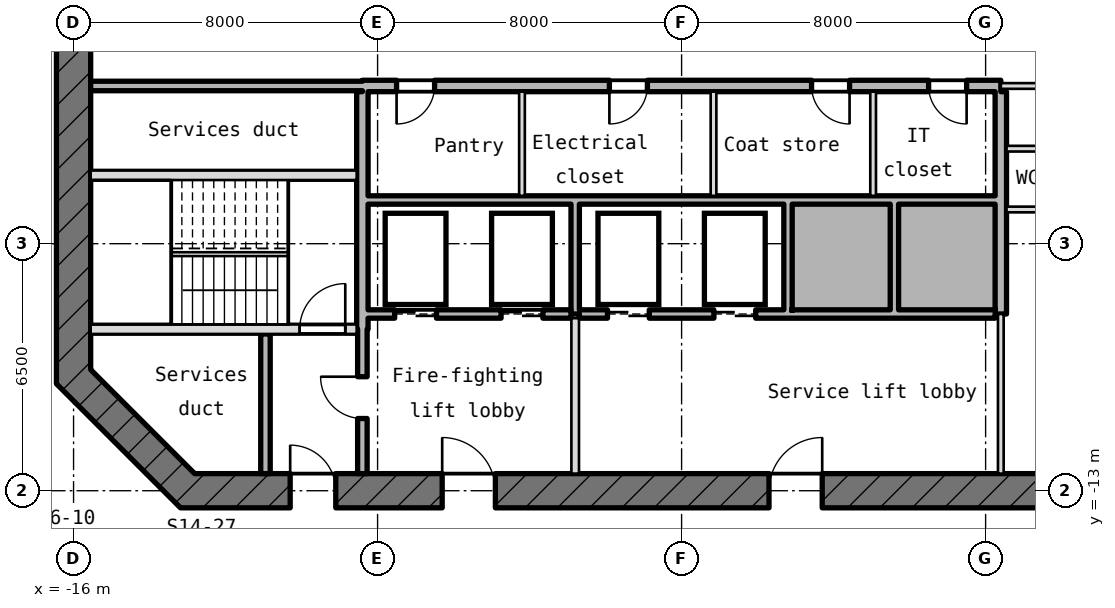
"""IFC4 building model, lengths in metres.
Left out: names, types, materials, properties, quantities, classifications, styles, units other than length and angle.
Written with IfcOpenShell. Run it as: python <this file> out.ifc"""

import sys

from ifc_helpers import new_model, si_unit, direction, frame, frame_2d, origin, place, context, subcontext, project, spatial, rectangle, extrude, element, fill, save


model = new_model("IFC4")
c1 = context("Model", 3, precision=1e-05, world=origin(), true_north=direction((0.0, 1.0)))
c2 = subcontext(c1, "Body", "Model", "MODEL_VIEW")
j1 = project(units=[si_unit("LENGTHUNIT", "METRE"), si_unit("PLANEANGLEUNIT", "RADIAN")], contexts=[c1])
p1 = place(None, origin())
s1 = spatial("IfcSite", under=j1, at=p1, CompositionType="ELEMENT")
p2 = place(p1, origin())
s2 = spatial("IfcBuilding", under=s1, at=p2, CompositionType="ELEMENT")
p3 = place(p2, frame((0.0, 0.0, 210.85)))
s3 = spatial("IfcBuildingStorey", under=s2, at=p3, CompositionType="ELEMENT", Elevation=210.85)
p4 = place(p3, frame((-16.0, 10.186, -0.18), z_axis=(0.0, 0.0, 1.0), x_axis=(0.0, -1.0, 0.0)))
e1 = element("IfcWall", 1, at=p4, inside=s3, PredefinedType="SHEAR", context=c2, shape_type="SweptSolid", body=[
    extrude(rectangle(XDim=20.373, YDim=0.9, at=frame_2d((10.186, 0.0))), origin(), (0.0, 0.0, 1.0), 4.15),
])
p5 = place(p4, frame((8.986, 0.0, 0.18)))
e2 = element("IfcOpeningElement", 2, at=p5, cuts=e1, PredefinedType="OPENING", context=c2, shape_type="SweptSolid", body=[
    extrude(rectangle(XDim=2.4, YDim=2.1, at=frame_2d((1.2, 1.05))), frame((0.0, 0.46, 0.0), z_axis=(0.0, -1.0, 0.0), x_axis=(1.0, 0.0, 0.0)), (0.0, 0.0, 1.0), 0.92),
])
p6 = place(p4, frame((5.586, 0.0, 0.18)))
e3 = element("IfcOpeningElement", 3, at=p6, cuts=e1, PredefinedType="OPENING", context=c2, shape_type="SweptSolid", body=[
    extrude(rectangle(XDim=1.2, YDim=2.1, at=frame_2d((0.6, 1.05))), frame((0.0, 0.46, 0.0), z_axis=(0.0, -1.0, 0.0), x_axis=(1.0, 0.0, 0.0)), (0.0, 0.0, 1.0), 0.92),
])
p7 = place(p3, frame((-16.132, -9.868, -0.18), z_axis=(0.0, 0.0, 1.0), x_axis=(0.707106781187, -0.707106781187, 0.0)))
e4 = element("IfcWall", 4, at=p7, inside=s3, PredefinedType="SHEAR", context=c2, shape_type="SweptSolid", body=[
    extrude(rectangle(XDim=4.615, YDim=0.9, at=frame_2d((2.308, 0.0))), origin(), (0.0, 0.0, 1.0), 4.15),
])
p8 = place(p3, frame((-13.186, -13.0, -0.18), z_axis=(0.0, 0.0, 1.0), x_axis=(1.0, 0.0, 0.0)))
e5 = element("IfcWall", 5, at=p8, inside=s3, PredefinedType="SHEAR", context=c2, shape_type="SweptSolid", body=[
    extrude(rectangle(XDim=26.373, YDim=0.9, at=frame_2d((13.186, 0.0))), origin(), (0.0, 0.0, 1.0), 4.15),
])
p9 = place(p8, frame((2.886, 0.0, 0.18)))
e6 = element("IfcOpeningElement", 6, at=p9, cuts=e5, PredefinedType="OPENING", context=c2, shape_type="SweptSolid", body=[
    extrude(rectangle(XDim=1.2, YDim=2.1, at=frame_2d((0.6, 1.05))), frame((0.0, 0.46, 0.0), z_axis=(0.0, -1.0, 0.0), x_axis=(1.0, 0.0, 0.0)), (0.0, 0.0, 1.0), 0.92),
])
p10 = place(p8, frame((6.886, 0.0, 0.18)))
e7 = element("IfcOpeningElement", 7, at=p10, cuts=e5, PredefinedType="OPENING", context=c2, shape_type="SweptSolid", body=[
    extrude(rectangle(XDim=1.4, YDim=2.1, at=frame_2d((0.7, 1.05))), frame((0.0, 0.46, 0.0), z_axis=(0.0, -1.0, 0.0), x_axis=(1.0, 0.0, 0.0)), (0.0, 0.0, 1.0), 0.92),
])
p11 = place(p8, frame((15.486, 0.0, 0.18)))
e8 = element("IfcOpeningElement", 8, at=p11, cuts=e5, PredefinedType="OPENING", context=c2, shape_type="SweptSolid", body=[
    extrude(rectangle(XDim=1.4, YDim=2.1, at=frame_2d((0.7, 1.05))), frame((0.0, 0.46, 0.0), z_axis=(0.0, -1.0, 0.0), x_axis=(1.0, 0.0, 0.0)), (0.0, 0.0, 1.0), 0.92),
])
p12 = place(p3, frame((-15.55, -8.75, -0.18), z_axis=(0.0, 0.0, 1.0), x_axis=(1.0, 0.0, 0.0)))
e9 = element("IfcWall", 9, at=p12, inside=s3, PredefinedType="SHEAR", context=c2, shape_type="SweptSolid", body=[
    extrude(rectangle(XDim=7.0, YDim=0.25, at=frame_2d((3.5, 0.0))), origin(), (0.0, 0.0, 1.0), 4.15),
])
p13 = place(p12, frame((5.5, 0.0, 0.18)))
e10 = element("IfcOpeningElement", 10, at=p13, cuts=e9, PredefinedType="OPENING", context=c2, shape_type="SweptSolid", body=[
    extrude(rectangle(XDim=1.2, YDim=2.1, at=frame_2d((0.6, 1.05))), frame((0.0, 0.135, 0.0), z_axis=(0.0, -1.0, 0.0), x_axis=(1.0, 0.0, 0.0)), (0.0, 0.0, 1.0), 0.27),
])
p14 = place(p3, frame((-8.25, -8.35, 0.0), z_axis=(0.0, 0.0, 1.0), x_axis=(1.0, 0.0, 0.0)))
e11 = element("IfcWall", 11, at=p14, inside=s3, PredefinedType="STANDARD", context=c2, shape_type="SweptSolid", body=[
    extrude(rectangle(XDim=5.34, YDim=0.22, at=frame_2d((2.67, 0.0))), origin(), (0.0, 0.0, 1.0), 3.97),
])
p15 = place(p14, frame((0.7, 0.0, 0.0)))
e12 = element("IfcOpeningElement", 12, at=p15, cuts=e11, PredefinedType="OPENING", context=c2, shape_type="SweptSolid", body=[
    extrude(rectangle(XDim=1.1, YDim=2.1, at=frame_2d((0.55, 1.05))), frame((0.0, 0.12, 0.0), z_axis=(0.0, -1.0, 0.0), x_axis=(1.0, 0.0, 0.0)), (0.0, 0.0, 1.0), 0.24),
])
p16 = place(p14, frame((3.5, 0.0, 0.0)))
e13 = element("IfcOpeningElement", 13, at=p16, cuts=e11, PredefinedType="OPENING", context=c2, shape_type="SweptSolid", body=[
    extrude(rectangle(XDim=1.1, YDim=2.1, at=frame_2d((0.55, 1.05))), frame((0.0, 0.12, 0.0), z_axis=(0.0, -1.0, 0.0), x_axis=(1.0, 0.0, 0.0)), (0.0, 0.0, 1.0), 0.24),
])
p17 = place(p3, frame((-2.69, -8.35, 0.0), z_axis=(0.0, 0.0, 1.0), x_axis=(1.0, 0.0, 0.0)))
e14 = element("IfcWall", 14, at=p17, inside=s3, PredefinedType="STANDARD", context=c2, shape_type="SweptSolid", body=[
    extrude(rectangle(XDim=10.94, YDim=0.22, at=frame_2d((5.47, 0.0))), origin(), (0.0, 0.0, 1.0), 3.97),
])
p18 = place(p17, frame((0.74, 0.0, 0.0)))
e15 = element("IfcOpeningElement", 15, at=p18, cuts=e14, PredefinedType="OPENING", context=c2, shape_type="SweptSolid", body=[
    extrude(rectangle(XDim=1.1, YDim=2.1, at=frame_2d((0.55, 1.05))), frame((0.0, 0.12, 0.0), z_axis=(0.0, -1.0, 0.0), x_axis=(1.0, 0.0, 0.0)), (0.0, 0.0, 1.0), 0.24),
])
p19 = place(p17, frame((3.54, 0.0, 0.0)))
e16 = element("IfcOpeningElement", 16, at=p19, cuts=e14, PredefinedType="OPENING", context=c2, shape_type="SweptSolid", body=[
    extrude(rectangle(XDim=1.1, YDim=2.1, at=frame_2d((0.55, 1.05))), frame((0.0, 0.12, 0.0), z_axis=(0.0, -1.0, 0.0), x_axis=(1.0, 0.0, 0.0)), (0.0, 0.0, 1.0), 0.24),
])
p20 = place(p3, frame((8.55, -5.6, 0.0), z_axis=(0.0, 0.0, 1.0), x_axis=(1.0, 0.0, 0.0)))
e17 = element("IfcWall", 17, at=p20, inside=s3, PredefinedType="PARTITIONING", context=c2, shape_type="SweptSolid", body=[
    extrude(rectangle(XDim=7.0, YDim=0.15, at=frame_2d((3.5, 0.0))), origin(), (0.0, 0.0, 1.0), 3.97),
])
p21 = place(p20, frame((2.925, 0.0, 0.0)))
e18 = element("IfcOpeningElement", 18, at=p21, cuts=e17, PredefinedType="OPENING", context=c2, shape_type="SweptSolid", body=[
    extrude(rectangle(XDim=1.0, YDim=2.1, at=frame_2d((0.5, 1.05))), frame((0.0, 0.085, 0.0), z_axis=(0.0, -1.0, 0.0), x_axis=(1.0, 0.0, 0.0)), (0.0, 0.0, 1.0), 0.17),
])
p22 = place(p3, frame((-8.25, -5.35, 0.0), z_axis=(0.0, 0.0, 1.0), x_axis=(1.0, 0.0, 0.0)))
e19 = element("IfcWall", 19, at=p22, inside=s3, PredefinedType="STANDARD", context=c2, shape_type="SweptSolid", body=[
    extrude(rectangle(XDim=16.5, YDim=0.22, at=frame_2d((8.25, 0.0))), origin(), (0.0, 0.0, 1.0), 3.97),
])
p23 = place(p3, frame((-15.55, -4.7, -0.18), z_axis=(0.0, 0.0, 1.0), x_axis=(1.0, 0.0, 0.0)))
e20 = element("IfcWall", 20, at=p23, inside=s3, PredefinedType="SHEAR", context=c2, shape_type="SweptSolid", body=[
    extrude(rectangle(XDim=7.0, YDim=0.25, at=frame_2d((3.5, 0.0))), origin(), (0.0, 0.0, 1.0), 4.15),
])
p24 = place(p3, frame((8.55, -4.0, 0.0), z_axis=(0.0, 0.0, 1.0), x_axis=(1.0, 0.0, 0.0)))
e21 = element("IfcWall", 21, at=p24, inside=s3, PredefinedType="PARTITIONING", context=c2, shape_type="SweptSolid", body=[
    extrude(rectangle(XDim=7.0, YDim=0.15, at=frame_2d((3.5, 0.0))), origin(), (0.0, 0.0, 1.0), 3.97),
])
p25 = place(p24, frame((2.925, 0.0, 0.0)))
e22 = element("IfcOpeningElement", 22, at=p25, cuts=e21, PredefinedType="OPENING", context=c2, shape_type="SweptSolid", body=[
    extrude(rectangle(XDim=1.0, YDim=2.1, at=frame_2d((0.5, 1.05))), frame((0.0, 0.085, 0.0), z_axis=(0.0, -1.0, 0.0), x_axis=(1.0, 0.0, 0.0)), (0.0, 0.0, 1.0), 0.17),
])
p26 = place(p3, frame((-15.55, -2.35, 0.0), z_axis=(0.0, 0.0, 1.0), x_axis=(1.0, 0.0, 0.0)))
e23 = element("IfcWall", 23, at=p26, inside=s3, PredefinedType="STANDARD", context=c2, shape_type="SweptSolid", body=[
    extrude(rectangle(XDim=7.15, YDim=0.25, at=frame_2d((3.575, 0.0))), origin(), (0.0, 0.0, 1.0), 3.97),
])
p27 = place(p3, frame((-8.4, -2.35, -0.18), z_axis=(0.0, 0.0, 1.0), x_axis=(1.0, 0.0, 0.0)))
e24 = element("IfcWall", 24, at=p27, inside=s3, PredefinedType="SHEAR", context=c2, shape_type="SweptSolid", body=[
    extrude(rectangle(XDim=16.8, YDim=0.3, at=frame_2d((8.4, 0.0))), origin(), (0.0, 0.0, 1.0), 4.15),
])
p28 = place(p27, frame((0.9, 0.0, 0.18)))
e25 = element("IfcOpeningElement", 25, at=p28, cuts=e24, PredefinedType="OPENING", context=c2, shape_type="SweptSolid", body=[
    extrude(rectangle(XDim=1.0, YDim=2.1, at=frame_2d((0.5, 1.05))), frame((0.0, 0.16, 0.0), z_axis=(0.0, -1.0, 0.0), x_axis=(1.0, 0.0, 0.0)), (0.0, 0.0, 1.0), 0.32),
])
p29 = place(p27, frame((6.5, 0.0, 0.18)))
e26 = element("IfcOpeningElement", 26, at=p29, cuts=e24, PredefinedType="OPENING", context=c2, shape_type="SweptSolid", body=[
    extrude(rectangle(XDim=1.0, YDim=2.1, at=frame_2d((0.5, 1.05))), frame((0.0, 0.16, 0.0), z_axis=(0.0, -1.0, 0.0), x_axis=(1.0, 0.0, 0.0)), (0.0, 0.0, 1.0), 0.32),
])
p30 = place(p27, frame((11.82, 0.0, 0.18)))
e27 = element("IfcOpeningElement", 27, at=p30, cuts=e24, PredefinedType="OPENING", context=c2, shape_type="SweptSolid", body=[
    extrude(rectangle(XDim=1.0, YDim=2.1, at=frame_2d((0.5, 1.05))), frame((0.0, 0.16, 0.0), z_axis=(0.0, -1.0, 0.0), x_axis=(1.0, 0.0, 0.0)), (0.0, 0.0, 1.0), 0.32),
])
p31 = place(p27, frame((14.9, 0.0, 0.18)))
e28 = element("IfcOpeningElement", 28, at=p31, cuts=e24, PredefinedType="OPENING", context=c2, shape_type="SweptSolid", body=[
    extrude(rectangle(XDim=1.0, YDim=2.1, at=frame_2d((0.5, 1.05))), frame((0.0, 0.16, 0.0), z_axis=(0.0, -1.0, 0.0), x_axis=(1.0, 0.0, 0.0)), (0.0, 0.0, 1.0), 0.32),
])
p32 = place(p3, frame((8.4, -2.35, 0.0), z_axis=(0.0, 0.0, 1.0), x_axis=(1.0, 0.0, 0.0)))
e29 = element("IfcWall", 29, at=p32, inside=s3, PredefinedType="PARTITIONING", context=c2, shape_type="SweptSolid", body=[
    extrude(rectangle(XDim=7.15, YDim=0.15, at=frame_2d((3.575, 0.0))), origin(), (0.0, 0.0, 1.0), 3.97),
])
p33 = place(p3, frame((-10.95, -12.55, 0.0), z_axis=(0.0, 0.0, 1.0), x_axis=(0.0, 1.0, 0.0)))
e30 = element("IfcWall", 30, at=p33, inside=s3, PredefinedType="STANDARD", context=c2, shape_type="SweptSolid", body=[
    extrude(rectangle(XDim=3.675, YDim=0.25, at=frame_2d((1.837, 0.0))), origin(), (0.0, 0.0, 1.0), 3.97),
])
p34 = place(p3, frame((-8.4, -12.55, 0.0), z_axis=(0.0, 0.0, 1.0), x_axis=(0.0, 1.0, 0.0)))
e31 = element("IfcWall", 31, at=p34, inside=s3, PredefinedType="STANDARD", context=c2, shape_type="SweptSolid", body=[
    extrude(rectangle(XDim=3.8, YDim=0.25, at=frame_2d((1.9, 0.0))), origin(), (0.0, 0.0, 1.0), 3.97),
])
p35 = place(p34, frame((1.45, 0.0, 0.0)))
e32 = element("IfcOpeningElement", 32, at=p35, cuts=e31, PredefinedType="OPENING", context=c2, shape_type="SweptSolid", body=[
    extrude(rectangle(XDim=1.1, YDim=2.1, at=frame_2d((0.55, 1.05))), frame((0.0, 0.135, 0.0), z_axis=(0.0, -1.0, 0.0), x_axis=(1.0, 0.0, 0.0)), (0.0, 0.0, 1.0), 0.27),
])
p36 = place(p3, frame((-8.4, -8.75, -0.18), z_axis=(0.0, 0.0, 1.0), x_axis=(0.0, 1.0, 0.0)))
e33 = element("IfcWall", 33, at=p36, inside=s3, PredefinedType="SHEAR", context=c2, shape_type="SweptSolid", body=[
    extrude(rectangle(XDim=6.25, YDim=0.3, at=frame_2d((3.125, 0.0))), origin(), (0.0, 0.0, 1.0), 4.15),
])
p37 = place(p3, frame((-4.2, -5.24, 0.0), z_axis=(0.0, 0.0, 1.0), x_axis=(0.0, 1.0, 0.0)))
e34 = element("IfcWall", 34, at=p37, inside=s3, PredefinedType="PARTITIONING", context=c2, shape_type="SweptSolid", body=[
    extrude(rectangle(XDim=2.74, YDim=0.15, at=frame_2d((1.37, 0.0))), origin(), (0.0, 0.0, 1.0), 3.97),
])
p38 = place(p3, frame((-2.8, -12.55, 0.0), z_axis=(0.0, 0.0, 1.0), x_axis=(0.0, 1.0, 0.0)))
e35 = element("IfcWall", 35, at=p38, inside=s3, PredefinedType="PARTITIONING", context=c2, shape_type="SweptSolid", body=[
    extrude(rectangle(XDim=4.09, YDim=0.2, at=frame_2d((2.045, 0.0))), origin(), (0.0, 0.0, 1.0), 3.97),
])
p39 = place(p3, frame((-2.8, -8.35, 0.0), z_axis=(0.0, 0.0, 1.0), x_axis=(0.0, 1.0, 0.0)))
e36 = element("IfcWall", 36, at=p39, inside=s3, PredefinedType="STANDARD", context=c2, shape_type="SweptSolid", body=[
    extrude(rectangle(XDim=2.89, YDim=0.22, at=frame_2d((1.445, 0.0))), origin(), (0.0, 0.0, 1.0), 3.97),
])
p40 = place(p3, frame((0.84, -5.24, 0.0), z_axis=(0.0, 0.0, 1.0), x_axis=(0.0, 1.0, 0.0)))
e37 = element("IfcWall", 37, at=p40, inside=s3, PredefinedType="PARTITIONING", context=c2, shape_type="SweptSolid", body=[
    extrude(rectangle(XDim=2.74, YDim=0.15, at=frame_2d((1.37, 0.0))), origin(), (0.0, 0.0, 1.0), 3.97),
])
p41 = place(p3, frame((2.8, -8.24, 0.0), z_axis=(0.0, 0.0, 1.0), x_axis=(0.0, 1.0, 0.0)))
e38 = element("IfcWall", 38, at=p41, inside=s3, PredefinedType="STANDARD", context=c2, shape_type="SweptSolid", body=[
    extrude(rectangle(XDim=2.78, YDim=0.22, at=frame_2d((1.39, 0.0))), origin(), (0.0, 0.0, 1.0), 3.97),
])
p42 = place(p3, frame((5.04, -5.24, 0.0), z_axis=(0.0, 0.0, 1.0), x_axis=(0.0, 1.0, 0.0)))
e39 = element("IfcWall", 39, at=p42, inside=s3, PredefinedType="PARTITIONING", context=c2, shape_type="SweptSolid", body=[
    extrude(rectangle(XDim=2.74, YDim=0.15, at=frame_2d((1.37, 0.0))), origin(), (0.0, 0.0, 1.0), 3.97),
])
p43 = place(p3, frame((5.6, -8.24, 0.0), z_axis=(0.0, 0.0, 1.0), x_axis=(0.0, 1.0, 0.0)))
e40 = element("IfcWall", 40, at=p43, inside=s3, PredefinedType="STANDARD", context=c2, shape_type="SweptSolid", body=[
    extrude(rectangle(XDim=2.78, YDim=0.22, at=frame_2d((1.39, 0.0))), origin(), (0.0, 0.0, 1.0), 3.97),
])
p44 = place(p3, frame((8.4, -12.55, 0.0), z_axis=(0.0, 0.0, 1.0), x_axis=(0.0, 1.0, 0.0)))
e41 = element("IfcWall", 41, at=p44, inside=s3, PredefinedType="PARTITIONING", context=c2, shape_type="SweptSolid", body=[
    extrude(rectangle(XDim=4.2, YDim=0.15, at=frame_2d((2.1, 0.0))), origin(), (0.0, 0.0, 1.0), 3.97),
])
p45 = place(p3, frame((8.4, -8.35, -0.18), z_axis=(0.0, 0.0, 1.0), x_axis=(0.0, 1.0, 0.0)))
e42 = element("IfcWall", 42, at=p45, inside=s3, PredefinedType="SHEAR", context=c2, shape_type="SweptSolid", body=[
    extrude(rectangle(XDim=5.85, YDim=0.3, at=frame_2d((2.925, 0.0))), origin(), (0.0, 0.0, 1.0), 4.15),
])
p46 = place(p15, origin())
e43 = element("IfcDoor", 43, at=p46, inside=s3, OperationType="DOUBLE_DOOR_SLIDING", PredefinedType="DOOR", context=c2, shape_type="SweptSolid", body=[
    extrude(rectangle(XDim=1.1, YDim=2.1, at=frame_2d((0.55, 1.05))), frame((0.0, 0.025, 0.0), z_axis=(0.0, -1.0, 0.0), x_axis=(1.0, 0.0, 0.0)), (0.0, 0.0, 1.0), 0.05),
])
fill(e12, e43)
p47 = place(p16, origin())
e44 = element("IfcDoor", 44, at=p47, inside=s3, OperationType="DOUBLE_DOOR_SLIDING", PredefinedType="DOOR", context=c2, shape_type="SweptSolid", body=[
    extrude(rectangle(XDim=1.1, YDim=2.1, at=frame_2d((0.55, 1.05))), frame((0.0, 0.025, 0.0), z_axis=(0.0, -1.0, 0.0), x_axis=(1.0, 0.0, 0.0)), (0.0, 0.0, 1.0), 0.05),
])
fill(e13, e44)
p48 = place(p18, origin())
e45 = element("IfcDoor", 45, at=p48, inside=s3, OperationType="DOUBLE_DOOR_SLIDING", PredefinedType="DOOR", context=c2, shape_type="SweptSolid", body=[
    extrude(rectangle(XDim=1.1, YDim=2.1, at=frame_2d((0.55, 1.05))), frame((0.0, 0.025, 0.0), z_axis=(0.0, -1.0, 0.0), x_axis=(1.0, 0.0, 0.0)), (0.0, 0.0, 1.0), 0.05),
])
fill(e15, e45)
p49 = place(p19, origin())
e46 = element("IfcDoor", 46, at=p49, inside=s3, OperationType="DOUBLE_DOOR_SLIDING", PredefinedType="DOOR", context=c2, shape_type="SweptSolid", body=[
    extrude(rectangle(XDim=1.1, YDim=2.1, at=frame_2d((0.55, 1.05))), frame((0.0, 0.025, 0.0), z_axis=(0.0, -1.0, 0.0), x_axis=(1.0, 0.0, 0.0)), (0.0, 0.0, 1.0), 0.05),
])
fill(e16, e46)
p50 = place(p13, origin())
e47 = element("IfcDoor", 47, at=p50, inside=s3, OperationType="SINGLE_SWING_RIGHT", PredefinedType="DOOR", context=c2, shape_type="SweptSolid", body=[
    extrude(rectangle(XDim=1.2, YDim=2.1, at=frame_2d((0.6, 1.05))), frame((0.0, 0.025, 0.0), z_axis=(0.0, -1.0, 0.0), x_axis=(1.0, 0.0, 0.0)), (0.0, 0.0, 1.0), 0.05),
])
fill(e10, e47)
p51 = place(p35, origin())
e48 = element("IfcDoor", 48, at=p51, inside=s3, OperationType="SINGLE_SWING_RIGHT", PredefinedType="DOOR", context=c2, shape_type="SweptSolid", body=[
    extrude(rectangle(XDim=1.1, YDim=2.1, at=frame_2d((0.55, 1.05))), frame((0.0, 0.025, 0.0), z_axis=(0.0, -1.0, 0.0), x_axis=(1.0, 0.0, 0.0)), (0.0, 0.0, 1.0), 0.05),
])
fill(e32, e48)
p52 = place(p9, origin())
e49 = element("IfcDoor", 49, at=p52, inside=s3, OperationType="SINGLE_SWING_RIGHT", PredefinedType="DOOR", context=c2, shape_type="SweptSolid", body=[
    extrude(rectangle(XDim=1.2, YDim=2.1, at=frame_2d((0.6, 1.05))), frame((0.0, 0.025, 0.0), z_axis=(0.0, -1.0, 0.0), x_axis=(1.0, 0.0, 0.0)), (0.0, 0.0, 1.0), 0.05),
])
fill(e6, e49)
p53 = place(p10, origin())
e50 = element("IfcDoor", 50, at=p53, inside=s3, OperationType="SINGLE_SWING_RIGHT", PredefinedType="DOOR", context=c2, shape_type="SweptSolid", body=[
    extrude(rectangle(XDim=1.4, YDim=2.1, at=frame_2d((0.7, 1.05))), frame((0.0, 0.025, 0.0), z_axis=(0.0, -1.0, 0.0), x_axis=(1.0, 0.0, 0.0)), (0.0, 0.0, 1.0), 0.05),
])
fill(e7, e50)
p54 = place(p11, origin())
e51 = element("IfcDoor", 51, at=p54, inside=s3, OperationType="SINGLE_SWING_RIGHT", PredefinedType="DOOR", context=c2, shape_type="SweptSolid", body=[
    extrude(rectangle(XDim=1.4, YDim=2.1, at=frame_2d((0.7, 1.05))), frame((0.0, 0.025, 0.0), z_axis=(0.0, -1.0, 0.0), x_axis=(1.0, 0.0, 0.0)), (0.0, 0.0, 1.0), 0.05),
])
fill(e8, e51)
p55 = place(p28, frame((1.0, 0.0, 0.0), z_axis=(0.0, 0.0, 1.0), x_axis=(-1.0, 0.0, 0.0)))
e52 = element("IfcDoor", 52, at=p55, inside=s3, OperationType="SINGLE_SWING_LEFT", PredefinedType="DOOR", context=c2, shape_type="SweptSolid", body=[
    extrude(rectangle(XDim=1.0, YDim=2.1, at=frame_2d((0.5, 1.05))), frame((0.0, 0.025, 0.0), z_axis=(0.0, -1.0, 0.0), x_axis=(1.0, 0.0, 0.0)), (0.0, 0.0, 1.0), 0.05),
])
fill(e25, e52)
p56 = place(p29, frame((1.0, 0.0, 0.0), z_axis=(0.0, 0.0, 1.0), x_axis=(-1.0, 0.0, 0.0)))
e53 = element("IfcDoor", 53, at=p56, inside=s3, OperationType="SINGLE_SWING_LEFT", PredefinedType="DOOR", context=c2, shape_type="SweptSolid", body=[
    extrude(rectangle(XDim=1.0, YDim=2.1, at=frame_2d((0.5, 1.05))), frame((0.0, 0.025, 0.0), z_axis=(0.0, -1.0, 0.0), x_axis=(1.0, 0.0, 0.0)), (0.0, 0.0, 1.0), 0.05),
])
fill(e26, e53)
p57 = place(p30, frame((1.0, 0.0, 0.0), z_axis=(0.0, 0.0, 1.0), x_axis=(-1.0, 0.0, 0.0)))
e54 = element("IfcDoor", 54, at=p57, inside=s3, OperationType="SINGLE_SWING_LEFT", PredefinedType="DOOR", context=c2, shape_type="SweptSolid", body=[
    extrude(rectangle(XDim=1.0, YDim=2.1, at=frame_2d((0.5, 1.05))), frame((0.0, 0.025, 0.0), z_axis=(0.0, -1.0, 0.0), x_axis=(1.0, 0.0, 0.0)), (0.0, 0.0, 1.0), 0.05),
])
fill(e27, e54)
p58 = place(p31, frame((1.0, 0.0, 0.0), z_axis=(0.0, 0.0, 1.0), x_axis=(-1.0, 0.0, 0.0)))
e55 = element("IfcDoor", 55, at=p58, inside=s3, OperationType="SINGLE_SWING_LEFT", PredefinedType="DOOR", context=c2, shape_type="SweptSolid", body=[
    extrude(rectangle(XDim=1.0, YDim=2.1, at=frame_2d((0.5, 1.05))), frame((0.0, 0.025, 0.0), z_axis=(0.0, -1.0, 0.0), x_axis=(1.0, 0.0, 0.0)), (0.0, 0.0, 1.0), 0.05),
])
fill(e28, e55)
save(model, sys.argv[1])
